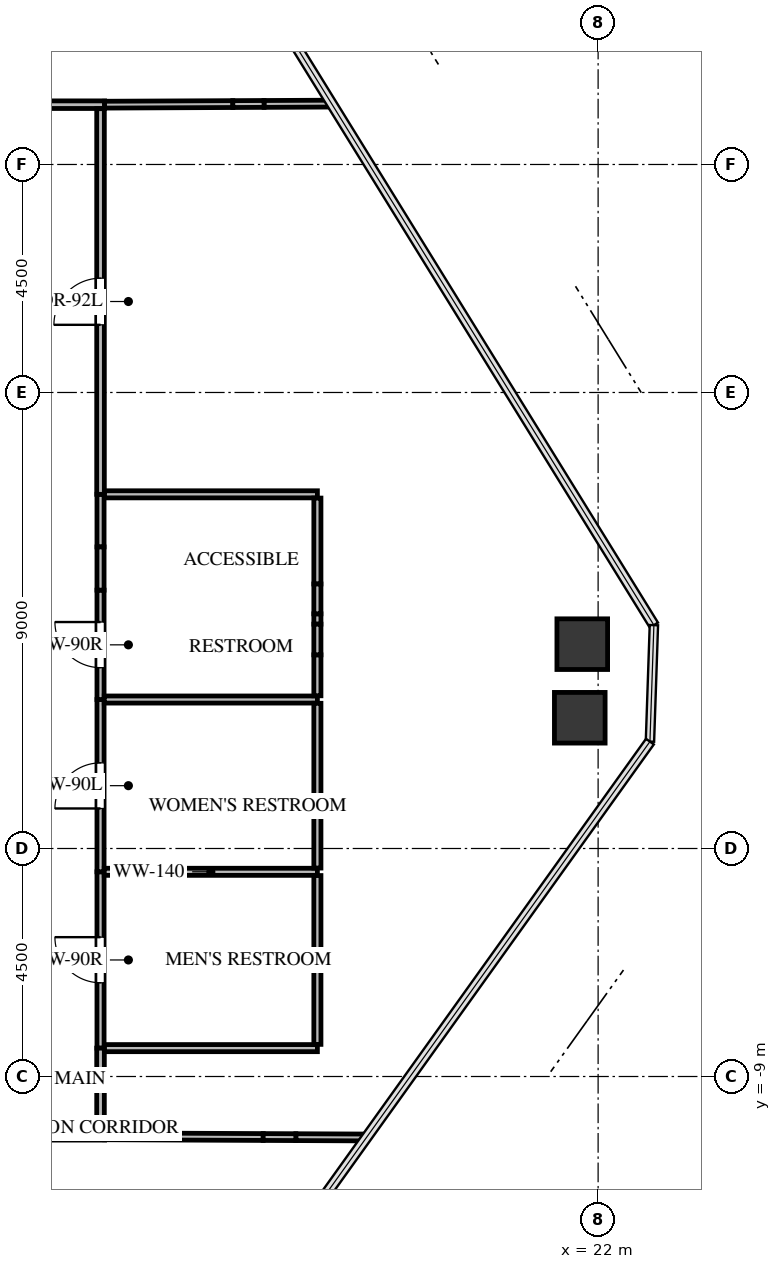
"""IFC4 building model, lengths in metres.
Left out: names, types, materials, properties, quantities, classifications, styles, units other than length and angle.
Written with IfcOpenShell. Run it as: python <this file> out.ifc"""

import sys

from ifc_helpers import new_model, si_unit, direction, frame, frame_2d, origin, origin_2d, place, context, subcontext, project, spatial, rectangle, extrude, source, transform, mapped, element, fill, save


model = new_model("IFC4")
c1 = context("Model", 3, precision=1e-05, world=origin(), true_north=direction((0.0, 1.0)))
c2 = subcontext(c1, "Body", "Model", "MODEL_VIEW")
j1 = project(units=[si_unit("LENGTHUNIT", "METRE"), si_unit("PLANEANGLEUNIT", "RADIAN")], contexts=[c1])
p1 = place(None, origin())
s1 = spatial("IfcSite", under=j1, at=p1, CompositionType="ELEMENT")
p2 = place(p1, origin())
s2 = spatial("IfcBuilding", under=s1, at=p2, CompositionType="ELEMENT")
p3 = place(p2, frame((0.0, 0.0, 203.2)))
s3 = spatial("IfcBuildingStorey", under=s2, at=p3, CompositionType="ELEMENT", Elevation=203.2)
m1 = source(origin(), c2, "Body", "SweptSolid", [
    extrude(rectangle(XDim=1.0, YDim=1.0, at=origin_2d()), origin(), (0.0, 0.0, 1.0), 3.0),
])
for number, where, z_axis, x_axis in (
    (1, (21.687, -0.467, -0.24), (0.0, 0.0, 1.0), (1.0, 0.0, 0.0)),
    (2, (21.638, -1.92, -0.24), (0.0, 0.0, 1.0), (1.0, 0.0, 0.0)),
):
    element("IfcColumn", number, at=place(p3, frame(where, z_axis=z_axis, x_axis=x_axis)), inside=s3, PredefinedType="COLUMN", context=c2, shape_type="MappedRepresentation", body=[
        mapped(m1, transform((0.0, 0.0, 0.0), x_axis=(1.0, 0.0, 0.0), y_axis=(0.0, 1.0, 0.0), z_axis=(0.0, 0.0, 1.0), scale=1.0)),
    ])
p4 = place(p3, frame((12.18, -8.44, 0.0), z_axis=(0.0, 0.0, 1.0), x_axis=(0.0, 1.0, 0.0)))
e3 = element("IfcWall", 3, at=p4, inside=s3, PredefinedType="PARTITIONING", context=c2, shape_type="SweptSolid", body=[
    extrude(rectangle(XDim=3.48, YDim=0.14, at=frame_2d((1.74, 0.0))), origin(), (0.0, 0.0, 1.0), 2.745),
])
p5 = place(p4, frame((1.29, 0.0, 0.0)))
e4 = element("IfcOpeningElement", 4, at=p5, cuts=e3, PredefinedType="OPENING", context=c2, shape_type="SweptSolid", body=[
    extrude(rectangle(XDim=0.9, YDim=2.05, at=frame_2d((0.45, 1.025))), frame((0.0, 0.08, 0.0), z_axis=(0.0, -1.0, 0.0), x_axis=(1.0, 0.0, 0.0)), (0.0, 0.0, 1.0), 0.16),
])
p6 = place(p3, frame((12.18, -4.96, 0.0), z_axis=(0.0, 0.0, 1.0), x_axis=(0.0, 1.0, 0.0)))
e5 = element("IfcWall", 5, at=p6, inside=s3, PredefinedType="PARTITIONING", context=c2, shape_type="SweptSolid", body=[
    extrude(rectangle(XDim=3.4, YDim=0.14, at=frame_2d((1.7, 0.0))), origin(), (0.0, 0.0, 1.0), 2.745),
])
p7 = place(p6, frame((1.25, 0.0, 0.0)))
e6 = element("IfcOpeningElement", 6, at=p7, cuts=e5, PredefinedType="OPENING", context=c2, shape_type="SweptSolid", body=[
    extrude(rectangle(XDim=0.9, YDim=2.05, at=frame_2d((0.45, 1.025))), frame((0.0, 0.08, 0.0), z_axis=(0.0, -1.0, 0.0), x_axis=(1.0, 0.0, 0.0)), (0.0, 0.0, 1.0), 0.16),
])
p8 = place(p3, frame((12.18, -1.56, 0.0), z_axis=(0.0, 0.0, 1.0), x_axis=(0.0, 1.0, 0.0)))
e7 = element("IfcWall", 7, at=p8, inside=s3, PredefinedType="PARTITIONING", context=c2, shape_type="SweptSolid", body=[
    extrude(rectangle(XDim=2.159, YDim=0.14, at=frame_2d((1.08, 0.0))), origin(), (0.0, 0.0, 1.0), 2.745),
])
p9 = place(p8, frame((0.629, 0.0, 0.0)))
e8 = element("IfcOpeningElement", 8, at=p9, cuts=e7, PredefinedType="OPENING", context=c2, shape_type="SweptSolid", body=[
    extrude(rectangle(XDim=0.9, YDim=2.05, at=frame_2d((0.45, 1.025))), frame((0.0, 0.08, 0.0), z_axis=(0.0, -1.0, 0.0), x_axis=(1.0, 0.0, 0.0)), (0.0, 0.0, 1.0), 0.16),
])
p10 = place(p3, frame((12.18, 1.452, 0.0), z_axis=(0.0, 0.0, 1.0), x_axis=(0.0, 1.0, 0.0)))
e9 = element("IfcWall", 9, at=p10, inside=s3, PredefinedType="PARTITIONING", context=c2, shape_type="SweptSolid", body=[
    extrude(rectangle(XDim=1.038, YDim=0.14, at=frame_2d((0.519, 0.0))), origin(), (0.0, 0.0, 1.0), 2.745),
])
p11 = place(p3, frame((12.18, 0.599, 0.0), z_axis=(0.0, 0.0, 1.0), x_axis=(0.0, 1.0, 0.0)))
e10 = element("IfcWall", 10, at=p11, inside=s3, PredefinedType="PARTITIONING", context=c2, shape_type="SweptSolid", body=[
    extrude(rectangle(XDim=0.853, YDim=0.14, at=frame_2d((0.427, 0.0))), origin(), (0.0, 0.0, 1.0), 1.942),
])
p12 = place(p3, frame((12.26, 10.18, 0.0), z_axis=(0.0, 0.0, 1.0), x_axis=(-1.0, 0.0, 0.0)))
e11 = element("IfcWall", 11, at=p12, inside=s3, PredefinedType="PARTITIONING", context=c2, shape_type="SweptSolid", body=[
    extrude(rectangle(XDim=1.114, YDim=0.15, at=frame_2d((0.557, 0.0))), origin(), (0.0, 0.0, 1.0), 2.745),
])
p13 = place(p3, frame((5.87, -10.18, 0.0), z_axis=(0.0, 0.0, 1.0), x_axis=(1.0, 0.0, 0.0)))
e12 = element("IfcWall", 12, at=p13, inside=s3, PredefinedType="PARTITIONING", context=c2, shape_type="SweptSolid", body=[
    extrude(rectangle(XDim=6.39, YDim=0.15, at=frame_2d((3.195, 0.0))), origin(), (0.0, 0.0, 1.0), 1.942),
])
p14 = place(p3, frame((12.18, 2.49, 0.0), z_axis=(0.0, 0.0, 1.0), x_axis=(0.0, 1.0, 0.0)))
e13 = element("IfcWall", 13, at=p14, inside=s3, PredefinedType="PARTITIONING", context=c2, shape_type="SweptSolid", body=[
    extrude(rectangle(XDim=7.611, YDim=0.15, at=frame_2d((3.806, 0.0))), origin(), (0.0, 0.0, 1.0), 2.745),
])
p15 = place(p14, frame((3.345, 0.0, 0.0)))
e14 = element("IfcOpeningElement", 14, at=p15, cuts=e13, PredefinedType="OPENING", context=c2, shape_type="SweptSolid", body=[
    extrude(rectangle(XDim=0.92, YDim=2.1, at=frame_2d((0.46, 1.05))), frame((0.0, 0.085, 0.0), z_axis=(0.0, -1.0, 0.0), x_axis=(1.0, 0.0, 0.0)), (0.0, 0.0, 1.0), 0.17),
])
p16 = place(p3, frame((12.18, -10.101, 0.0), z_axis=(0.0, 0.0, 1.0), x_axis=(0.0, 1.0, 0.0)))
e15 = element("IfcWall", 15, at=p16, inside=s3, PredefinedType="PARTITIONING", context=c2, shape_type="SweptSolid", body=[
    extrude(rectangle(XDim=1.661, YDim=0.15, at=frame_2d((0.831, 0.0))), origin(), (0.0, 0.0, 1.0), 2.745),
])
p17 = place(p3, frame((12.254, -4.96, 0.0), z_axis=(0.0, 0.0, 1.0), x_axis=(1.0, 0.0, 0.0)))
e16 = element("IfcWall", 16, at=p17, inside=s3, PredefinedType="PARTITIONING", context=c2, shape_type="SweptSolid", body=[
    extrude(rectangle(XDim=4.206, YDim=0.14, at=frame_2d((2.103, 0.0))), origin(), (0.0, 0.0, 1.0), 2.745),
])
p18 = place(p3, frame((16.46, -8.44, 0.0), z_axis=(0.0, 0.0, 1.0), x_axis=(-1.0, 0.0, 0.0)))
e17 = element("IfcWall", 17, at=p18, inside=s3, PredefinedType="PARTITIONING", context=c2, shape_type="SweptSolid", body=[
    extrude(rectangle(XDim=4.201, YDim=0.14, at=frame_2d((2.101, 0.0))), origin(), (0.0, 0.0, 1.0), 2.745),
])
p19 = place(p3, frame((16.46, -5.034, 0.0), z_axis=(0.0, 0.0, 1.0), x_axis=(0.0, -1.0, 0.0)))
e18 = element("IfcWall", 18, at=p19, inside=s3, PredefinedType="PARTITIONING", context=c2, shape_type="SweptSolid", body=[
    extrude(rectangle(XDim=3.332, YDim=0.14, at=frame_2d((1.666, 0.0))), origin(), (0.0, 0.0, 1.0), 2.745),
])
p20 = place(p3, frame((12.254, -1.56, 0.0), z_axis=(0.0, 0.0, 1.0), x_axis=(1.0, 0.0, 0.0)))
e19 = element("IfcWall", 19, at=p20, inside=s3, PredefinedType="PARTITIONING", context=c2, shape_type="SweptSolid", body=[
    extrude(rectangle(XDim=4.206, YDim=0.14, at=frame_2d((2.103, 0.0))), origin(), (0.0, 0.0, 1.0), 2.745),
])
p21 = place(p3, frame((16.46, -1.634, 0.0), z_axis=(0.0, 0.0, 1.0), x_axis=(0.0, -1.0, 0.0)))
e20 = element("IfcWall", 20, at=p21, inside=s3, PredefinedType="PARTITIONING", context=c2, shape_type="SweptSolid", body=[
    extrude(rectangle(XDim=3.252, YDim=0.14, at=frame_2d((1.626, 0.0))), origin(), (0.0, 0.0, 1.0), 2.745),
])
p22 = place(p3, frame((12.259, 2.49, 0.0), z_axis=(0.0, 0.0, 1.0), x_axis=(1.0, 0.0, 0.0)))
e21 = element("IfcWall", 21, at=p22, inside=s3, PredefinedType="PARTITIONING", context=c2, shape_type="SweptSolid", body=[
    extrude(rectangle(XDim=4.201, YDim=0.14, at=frame_2d((2.101, 0.0))), origin(), (0.0, 0.0, 1.0), 2.745),
])
p23 = place(p3, frame((16.46, 2.416, 0.0), z_axis=(0.0, 0.0, 1.0), x_axis=(0.0, -1.0, 0.0)))
e22 = element("IfcWall", 22, at=p23, inside=s3, PredefinedType="PARTITIONING", context=c2, shape_type="SweptSolid", body=[
    extrude(rectangle(XDim=1.696, YDim=0.14, at=frame_2d((0.848, 0.0))), origin(), (0.0, 0.0, 1.0), 2.745),
])
p24 = place(p3, frame((16.46, 0.131, 0.0), z_axis=(0.0, 0.0, 1.0), x_axis=(0.0, -1.0, 0.0)))
e23 = element("IfcWall", 23, at=p24, inside=s3, PredefinedType="PARTITIONING", context=c2, shape_type="SweptSolid", body=[
    extrude(rectangle(XDim=0.203, YDim=0.14, at=frame_2d((0.102, 0.0))), origin(), (0.0, 0.0, 1.0), 2.745),
])
p25 = place(p3, frame((16.46, -0.678, 0.0), z_axis=(0.0, 0.0, 1.0), x_axis=(0.0, -1.0, 0.0)))
e24 = element("IfcWall", 24, at=p25, inside=s3, PredefinedType="PARTITIONING", context=c2, shape_type="SweptSolid", body=[
    extrude(rectangle(XDim=0.808, YDim=0.14, at=frame_2d((0.404, 0.0))), origin(), (0.0, 0.0, 1.0), 2.745),
])
p26 = place(p3, frame((16.46, 0.72, 0.0), z_axis=(0.0, 0.0, 1.0), x_axis=(0.0, -1.0, 0.0)))
e25 = element("IfcWall", 25, at=p26, inside=s3, PredefinedType="PARTITIONING", context=c2, shape_type="SweptSolid", body=[
    extrude(rectangle(XDim=0.589, YDim=0.14, at=frame_2d((0.294, 0.0))), origin(), (0.0, 0.0, 1.0), 1.942),
])
p27 = place(p3, frame((16.46, -0.072, 0.0), z_axis=(0.0, 0.0, 1.0), x_axis=(0.0, -1.0, 0.0)))
e26 = element("IfcWall", 26, at=p27, inside=s3, PredefinedType="PARTITIONING", context=c2, shape_type="SweptSolid", body=[
    extrude(rectangle(XDim=0.606, YDim=0.14, at=frame_2d((0.303, 0.0))), origin(), (0.0, 0.0, 1.0), 1.942),
])
p28 = place(p3, frame((16.74, 10.201, 0.0), z_axis=(0.0, 0.0, 1.0), x_axis=(-0.999989521507, -0.004577868163, 0.0)))
e27 = element("IfcWall", 27, at=p28, inside=s3, PredefinedType="PARTITIONING", context=c2, shape_type="SweptSolid", body=[
    extrude(rectangle(XDim=1.333, YDim=0.135, at=frame_2d((0.667, 0.0))), origin(), (0.0, 0.0, 1.0), 2.745),
])
p29 = place(p3, frame((14.791, 10.192, 0.0), z_axis=(0.0, 0.0, 1.0), x_axis=(-0.999989725302, -0.004533132435, 0.0)))
e28 = element("IfcWall", 28, at=p29, inside=s3, PredefinedType="PARTITIONING", context=c2, shape_type="SweptSolid", body=[
    extrude(rectangle(XDim=2.531, YDim=0.135, at=frame_2d((1.266, 0.0))), origin(), (0.0, 0.0, 1.0), 2.745),
])
p30 = place(p3, frame((15.407, 10.195, 0.0), z_axis=(0.0, 0.0, 1.0), x_axis=(-0.999988671317, -0.004759961942, 0.0)))
e29 = element("IfcWall", 29, at=p30, inside=s3, PredefinedType="PARTITIONING", context=c2, shape_type="SweptSolid", body=[
    extrude(rectangle(XDim=0.615, YDim=0.135, at=frame_2d((0.308, 0.0))), origin(), (0.0, 0.0, 1.0), 2.099),
])
p31 = place(p3, frame((12.26, -10.18, 0.0), z_axis=(0.0, 0.0, 1.0), x_axis=(0.999990120522, -0.004445093728, 0.0)))
e30 = element("IfcWall", 30, at=p31, inside=s3, PredefinedType="PARTITIONING", context=c2, shape_type="SweptSolid", body=[
    extrude(rectangle(XDim=3.131, YDim=0.135, at=frame_2d((1.565, 0.0))), origin(), (0.0, 0.0, 1.0), 2.745),
])
p32 = place(p3, frame((16.034, -10.197, 0.0), z_axis=(0.0, 0.0, 1.0), x_axis=(0.999989640625, -0.004551773574, 0.0)))
e31 = element("IfcWall", 31, at=p32, inside=s3, PredefinedType="PARTITIONING", context=c2, shape_type="SweptSolid", body=[
    extrude(rectangle(XDim=1.395, YDim=0.135, at=frame_2d((0.697, 0.0))), origin(), (0.0, 0.0, 1.0), 2.745),
])
p33 = place(p3, frame((15.391, -10.194, 0.0), z_axis=(0.0, 0.0, 1.0), x_axis=(0.999991299796, -0.00417137061, 0.0)))
e32 = element("IfcWall", 32, at=p33, inside=s3, PredefinedType="PARTITIONING", context=c2, shape_type="SweptSolid", body=[
    extrude(rectangle(XDim=0.644, YDim=0.135, at=frame_2d((0.322, 0.0))), origin(), (0.0, 0.0, 1.0), 2.099),
])
m2 = source(origin(), c2, "Body", "SweptSolid", [
    extrude(rectangle(XDim=0.9, YDim=2.05, at=frame_2d((0.45, 1.025))), frame((0.0, 0.025, 0.0), z_axis=(0.0, -1.0, 0.0), x_axis=(1.0, 0.0, 0.0)), (0.0, 0.0, 1.0), 0.05),
])
p34 = place(p5, origin())
e33 = element("IfcDoor", 33, at=p34, inside=s3, OperationType="SINGLE_SWING_RIGHT", PredefinedType="DOOR", context=c2, shape_type="MappedRepresentation", body=[
    mapped(m2, transform((0.0, 0.0, 0.0), x_axis=(1.0, 0.0, 0.0), y_axis=(0.0, 1.0, 0.0), z_axis=(0.0, 0.0, 1.0), scale=1.0)),
])
fill(e4, e33)
m3 = source(origin(), c2, "Body", "SweptSolid", [
    extrude(rectangle(XDim=0.9, YDim=2.05, at=frame_2d((0.45, 1.025))), frame((0.0, 0.025, 0.0), z_axis=(0.0, -1.0, 0.0), x_axis=(1.0, 0.0, 0.0)), (0.0, 0.0, 1.0), 0.05),
])
p35 = place(p7, origin())
e34 = element("IfcDoor", 34, at=p35, inside=s3, OperationType="SINGLE_SWING_LEFT", PredefinedType="DOOR", context=c2, shape_type="MappedRepresentation", body=[
    mapped(m3, transform((0.0, 0.0, 0.0), x_axis=(1.0, 0.0, 0.0), y_axis=(0.0, 1.0, 0.0), z_axis=(0.0, 0.0, 1.0), scale=1.0)),
])
fill(e6, e34)
p36 = place(p9, origin())
e35 = element("IfcDoor", 35, at=p36, inside=s3, OperationType="SINGLE_SWING_RIGHT", PredefinedType="DOOR", context=c2, shape_type="MappedRepresentation", body=[
    mapped(m2, transform((0.0, 0.0, 0.0), x_axis=(1.0, 0.0, 0.0), y_axis=(0.0, 1.0, 0.0), z_axis=(0.0, 0.0, 1.0), scale=1.0)),
])
fill(e8, e35)
m4 = source(origin(), c2, "Body", "SweptSolid", [
    extrude(rectangle(XDim=0.92, YDim=2.1, at=frame_2d((0.46, 1.05))), frame((0.0, 0.025, 0.0), z_axis=(0.0, -1.0, 0.0), x_axis=(1.0, 0.0, 0.0)), (0.0, 0.0, 1.0), 0.05),
])
p37 = place(p15, origin())
e36 = element("IfcDoor", 36, at=p37, inside=s3, OperationType="SINGLE_SWING_LEFT", PredefinedType="DOOR", context=c2, shape_type="MappedRepresentation", body=[
    mapped(m4, transform((0.0, 0.0, 0.0), x_axis=(1.0, 0.0, 0.0), y_axis=(0.0, 1.0, 0.0), z_axis=(0.0, 0.0, 1.0), scale=1.0)),
])
fill(e14, e36)
save(model, sys.argv[1])
